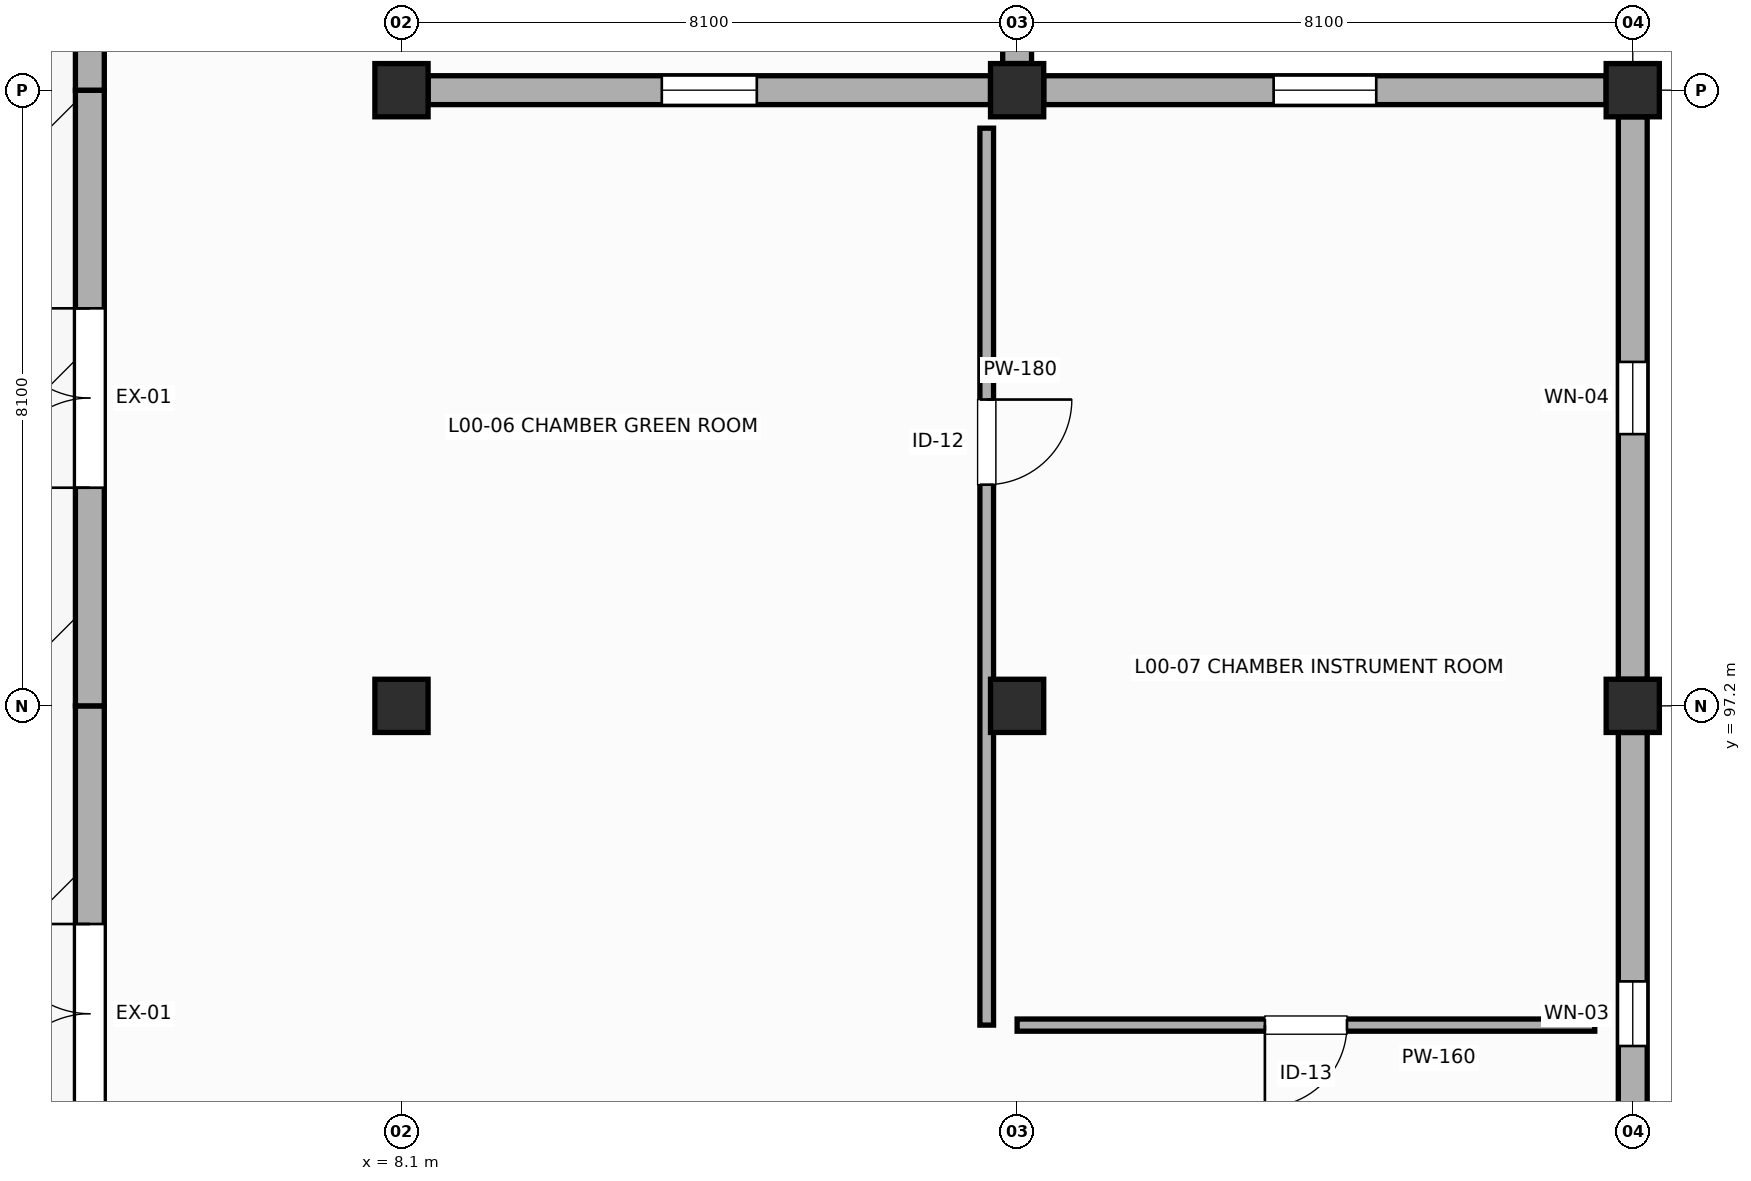
"""IFC4 building model, lengths in metres.
Left out: names, types, materials, properties, quantities, classifications, styles, units other than length and angle.
Written with IfcOpenShell. Run it as: python <this file> out.ifc"""

import sys

from ifc_helpers import new_model, si_unit, direction, frame, frame_2d, origin, origin_2d, place, context, subcontext, project, spatial, rectangle, extrude, element, fill, save


model = new_model("IFC4")
c1 = context("Model", 3, precision=1e-05, world=origin(), true_north=direction((0.0, 1.0)))
c2 = subcontext(c1, "Body", "Model", "MODEL_VIEW")
j1 = project(units=[si_unit("LENGTHUNIT", "METRE"), si_unit("PLANEANGLEUNIT", "RADIAN")], contexts=[c1])
p1 = place(None, origin())
s1 = spatial("IfcSite", under=j1, at=p1, CompositionType="ELEMENT")
p2 = place(p1, origin())
s2 = spatial("IfcBuilding", under=s1, at=p2, CompositionType="ELEMENT")
p3 = place(p2, origin())
s3 = spatial("IfcBuildingStorey", under=s2, at=p3, CompositionType="ELEMENT", Elevation=0.0)
for number, where, z_axis, x_axis in (
    (1, (8.1, 97.2, 0.0), (0.0, 0.0, 1.0), (1.0, 0.0, 0.0)),
    (2, (8.1, 105.3, 0.0), (0.0, 0.0, 1.0), (1.0, 0.0, 0.0)),
    (3, (16.2, 97.2, 0.0), (0.0, 0.0, 1.0), (1.0, 0.0, 0.0)),
    (4, (16.2, 105.3, 0.0), (0.0, 0.0, 1.0), (1.0, 0.0, 0.0)),
    (5, (24.3, 97.2, 0.0), (0.0, 0.0, 1.0), (1.0, 0.0, 0.0)),
    (6, (24.3, 105.3, 0.0), (0.0, 0.0, 1.0), (1.0, 0.0, 0.0)),
):
    element("IfcColumn", number, at=place(p3, frame(where, z_axis=z_axis, x_axis=x_axis)), inside=s3, PredefinedType="COLUMN", context=c2, shape_type="SweptSolid", body=[
        extrude(rectangle(XDim=0.7, YDim=0.7, at=origin_2d()), origin(), (0.0, 0.0, 1.0), 5.4),
    ])
p4 = place(p3, frame((4.0, 89.1, 0.0), z_axis=(0.0, 0.0, 1.0), x_axis=(0.0, 1.0, 0.0)))
e7 = element("IfcWall", 7, at=p4, inside=s3, PredefinedType="SOLIDWALL", context=c2, shape_type="SweptSolid", body=[
    extrude(rectangle(XDim=8.1, YDim=0.38, at=frame_2d((4.05, 0.0))), origin(), (0.0, 0.0, 1.0), 5.05),
])
p5 = place(p4, frame((2.87, 0.0, 0.0)))
e8 = element("IfcOpeningElement", 8, at=p5, cuts=e7, PredefinedType="OPENING", context=c2, shape_type="SweptSolid", body=[
    extrude(rectangle(XDim=2.36, YDim=2.4, at=frame_2d((1.18, 1.2))), frame((0.0, 0.2, 0.0), z_axis=(0.0, -1.0, 0.0), x_axis=(1.0, 0.0, 0.0)), (0.0, 0.0, 1.0), 0.4),
])
p6 = place(p3, frame((4.0, 97.2, 0.0), z_axis=(0.0, 0.0, 1.0), x_axis=(0.0, 1.0, 0.0)))
e9 = element("IfcWall", 9, at=p6, inside=s3, PredefinedType="SOLIDWALL", context=c2, shape_type="SweptSolid", body=[
    extrude(rectangle(XDim=8.1, YDim=0.38, at=frame_2d((4.05, 0.0))), origin(), (0.0, 0.0, 1.0), 5.05),
])
p7 = place(p6, frame((2.87, 0.0, 0.0)))
e10 = element("IfcOpeningElement", 10, at=p7, cuts=e9, PredefinedType="OPENING", context=c2, shape_type="SweptSolid", body=[
    extrude(rectangle(XDim=2.36, YDim=2.4, at=frame_2d((1.18, 1.2))), frame((0.0, 0.2, 0.0), z_axis=(0.0, -1.0, 0.0), x_axis=(1.0, 0.0, 0.0)), (0.0, 0.0, 1.0), 0.4),
])
p8 = place(p3, frame((8.45, 105.3, 0.0), z_axis=(0.0, 0.0, 1.0), x_axis=(1.0, 0.0, 0.0)))
e11 = element("IfcWall", 11, at=p8, inside=s3, PredefinedType="SOLIDWALL", context=c2, shape_type="SweptSolid", body=[
    extrude(rectangle(XDim=7.4, YDim=0.38, at=frame_2d((3.7, 0.0))), origin(), (0.0, 0.0, 1.0), 4.55),
])
p9 = place(p8, frame((3.075, 0.0, 0.9)))
e12 = element("IfcOpeningElement", 12, at=p9, cuts=e11, PredefinedType="OPENING", context=c2, shape_type="SweptSolid", body=[
    extrude(rectangle(XDim=1.25, YDim=1.55, at=frame_2d((0.625, 0.775))), frame((0.0, 0.2, 0.0), z_axis=(0.0, -1.0, 0.0), x_axis=(1.0, 0.0, 0.0)), (0.0, 0.0, 1.0), 0.4),
])
p10 = place(p3, frame((16.55, 105.3, 0.0), z_axis=(0.0, 0.0, 1.0), x_axis=(1.0, 0.0, 0.0)))
e13 = element("IfcWall", 13, at=p10, inside=s3, PredefinedType="SOLIDWALL", context=c2, shape_type="SweptSolid", body=[
    extrude(rectangle(XDim=7.4, YDim=0.38, at=frame_2d((3.7, 0.0))), origin(), (0.0, 0.0, 1.0), 4.677),
])
p11 = place(p10, frame((3.025, 0.0, 0.9)))
e14 = element("IfcOpeningElement", 14, at=p11, cuts=e13, PredefinedType="OPENING", context=c2, shape_type="SweptSolid", body=[
    extrude(rectangle(XDim=1.35, YDim=1.45, at=frame_2d((0.675, 0.725))), frame((0.0, 0.2, 0.0), z_axis=(0.0, -1.0, 0.0), x_axis=(1.0, 0.0, 0.0)), (0.0, 0.0, 1.0), 0.4),
])
p12 = place(p3, frame((24.3, 89.45, 0.0), z_axis=(0.0, 0.0, 1.0), x_axis=(0.0, 1.0, 0.0)))
e15 = element("IfcWall", 15, at=p12, inside=s3, PredefinedType="SOLIDWALL", context=c2, shape_type="SweptSolid", body=[
    extrude(rectangle(XDim=7.4, YDim=0.38, at=frame_2d((3.7, 0.0))), origin(), (0.0, 0.0, 1.0), 4.737),
])
p13 = place(p12, frame((3.275, 0.0, 0.9)))
e16 = element("IfcOpeningElement", 16, at=p13, cuts=e15, PredefinedType="OPENING", context=c2, shape_type="SweptSolid", body=[
    extrude(rectangle(XDim=0.85, YDim=1.75, at=frame_2d((0.425, 0.875))), frame((0.0, 0.2, 0.0), z_axis=(0.0, -1.0, 0.0), x_axis=(1.0, 0.0, 0.0)), (0.0, 0.0, 1.0), 0.4),
])
p14 = place(p3, frame((24.3, 97.55, 0.0), z_axis=(0.0, 0.0, 1.0), x_axis=(0.0, 1.0, 0.0)))
e17 = element("IfcWall", 17, at=p14, inside=s3, PredefinedType="SOLIDWALL", context=c2, shape_type="SweptSolid", body=[
    extrude(rectangle(XDim=7.4, YDim=0.38, at=frame_2d((3.7, 0.0))), origin(), (0.0, 0.0, 1.0), 4.737),
])
p15 = place(p14, frame((3.225, 0.0, 0.9)))
e18 = element("IfcOpeningElement", 18, at=p15, cuts=e17, PredefinedType="OPENING", context=c2, shape_type="SweptSolid", body=[
    extrude(rectangle(XDim=0.95, YDim=1.25, at=frame_2d((0.475, 0.625))), frame((0.0, 0.2, 0.0), z_axis=(0.0, -1.0, 0.0), x_axis=(1.0, 0.0, 0.0)), (0.0, 0.0, 1.0), 0.4),
])
p16 = place(p3, frame((16.2, 105.65, 0.0), z_axis=(0.0, 0.0, 1.0), x_axis=(0.0, 1.0, 0.0)))
e19 = element("IfcWall", 19, at=p16, inside=s3, PredefinedType="SOLIDWALL", context=c2, shape_type="SweptSolid", body=[
    extrude(rectangle(XDim=7.4, YDim=0.38, at=frame_2d((3.7, 0.0))), origin(), (0.0, 0.0, 1.0), 4.807),
])
p17 = place(p16, frame((3.225, 0.0, 0.9)))
e20 = element("IfcOpeningElement", 20, at=p17, cuts=e19, PredefinedType="OPENING", context=c2, shape_type="SweptSolid", body=[
    extrude(rectangle(XDim=0.95, YDim=1.55, at=frame_2d((0.475, 0.775))), frame((0.0, 0.2, 0.0), z_axis=(0.0, -1.0, 0.0), x_axis=(1.0, 0.0, 0.0)), (0.0, 0.0, 1.0), 0.4),
])
p18 = place(p3, frame((4.0, 113.4, 0.0), z_axis=(0.0, 0.0, 1.0), x_axis=(0.0, -1.0, 0.0)))
e21 = element("IfcWall", 21, at=p18, inside=s3, PredefinedType="SOLIDWALL", context=c2, shape_type="SweptSolid", body=[
    extrude(rectangle(XDim=8.1, YDim=0.38, at=frame_2d((4.05, 0.0))), origin(), (0.0, 0.0, 1.0), 5.1),
])
p19 = place(p18, frame((3.525, 0.0, 0.9)))
e22 = element("IfcOpeningElement", 22, at=p19, cuts=e21, PredefinedType="OPENING", context=c2, shape_type="SweptSolid", body=[
    extrude(rectangle(XDim=1.05, YDim=1.35, at=frame_2d((0.525, 0.675))), frame((0.0, 0.2, 0.0), z_axis=(0.0, -1.0, 0.0), x_axis=(1.0, 0.0, 0.0)), (0.0, 0.0, 1.0), 0.4),
])
p20 = place(p3, frame((15.8, 104.8, 0.0), z_axis=(0.0, 0.0, 1.0), x_axis=(0.0, -1.0, 0.0)))
e23 = element("IfcWall", 23, at=p20, inside=s3, PredefinedType="PARTITIONING", context=c2, shape_type="SweptSolid", body=[
    extrude(rectangle(XDim=11.8, YDim=0.18, at=frame_2d((5.9, 0.0))), origin(), (0.0, 0.0, 1.0), 5.12),
])
p21 = place(p20, frame((3.57, 0.0, 0.0)))
e24 = element("IfcOpeningElement", 24, at=p21, cuts=e23, PredefinedType="OPENING", context=c2, shape_type="SweptSolid", body=[
    extrude(rectangle(XDim=1.12, YDim=2.18, at=frame_2d((0.56, 1.09))), frame((0.0, 0.1, 0.0), z_axis=(0.0, -1.0, 0.0), x_axis=(1.0, 0.0, 0.0)), (0.0, 0.0, 1.0), 0.2),
])
p22 = place(p3, frame((23.8, 93.0, 0.0), z_axis=(0.0, 0.0, 1.0), x_axis=(-1.0, 0.0, 0.0)))
e25 = element("IfcWall", 25, at=p22, inside=s3, PredefinedType="PARTITIONING", context=c2, shape_type="SweptSolid", body=[
    extrude(rectangle(XDim=7.6, YDim=0.16, at=frame_2d((3.8, 0.0))), origin(), (0.0, 0.0, 1.0), 4.788),
])
p23 = place(p22, frame((3.26, 0.0, 0.0)))
e26 = element("IfcOpeningElement", 26, at=p23, cuts=e25, PredefinedType="OPENING", context=c2, shape_type="SweptSolid", body=[
    extrude(rectangle(XDim=1.08, YDim=2.15, at=frame_2d((0.54, 1.075))), frame((0.0, 0.09, 0.0), z_axis=(0.0, -1.0, 0.0), x_axis=(1.0, 0.0, 0.0)), (0.0, 0.0, 1.0), 0.18),
])
p24 = place(p5, origin())
e27 = element("IfcDoor", 27, at=p24, inside=s3, OperationType="DOUBLE_DOOR_SINGLE_SWING", PredefinedType="DOOR", context=c2, shape_type="SweptSolid", body=[
    extrude(rectangle(XDim=2.36, YDim=2.4, at=frame_2d((1.18, 1.2))), frame((0.0, 0.025, 0.0), z_axis=(0.0, -1.0, 0.0), x_axis=(1.0, 0.0, 0.0)), (0.0, 0.0, 1.0), 0.05),
])
fill(e8, e27)
p25 = place(p7, origin())
e28 = element("IfcDoor", 28, at=p25, inside=s3, OperationType="DOUBLE_DOOR_SINGLE_SWING", PredefinedType="DOOR", context=c2, shape_type="SweptSolid", body=[
    extrude(rectangle(XDim=2.36, YDim=2.4, at=frame_2d((1.18, 1.2))), frame((0.0, 0.025, 0.0), z_axis=(0.0, -1.0, 0.0), x_axis=(1.0, 0.0, 0.0)), (0.0, 0.0, 1.0), 0.05),
])
fill(e10, e28)
p26 = place(p9, origin())
e29 = element("IfcWindow", 29, at=p26, inside=s3, PartitioningType="SINGLE_PANEL", PredefinedType="WINDOW", context=c2, shape_type="SweptSolid", body=[
    extrude(rectangle(XDim=1.25, YDim=1.55, at=frame_2d((0.625, 0.775))), frame((0.0, 0.03, 0.0), z_axis=(0.0, -1.0, 0.0), x_axis=(1.0, 0.0, 0.0)), (0.0, 0.0, 1.0), 0.06),
])
fill(e12, e29)
p27 = place(p11, origin())
e30 = element("IfcWindow", 30, at=p27, inside=s3, PartitioningType="SINGLE_PANEL", PredefinedType="WINDOW", context=c2, shape_type="SweptSolid", body=[
    extrude(rectangle(XDim=1.35, YDim=1.45, at=frame_2d((0.675, 0.725))), frame((0.0, 0.03, 0.0), z_axis=(0.0, -1.0, 0.0), x_axis=(1.0, 0.0, 0.0)), (0.0, 0.0, 1.0), 0.06),
])
fill(e14, e30)
p28 = place(p13, origin())
e31 = element("IfcWindow", 31, at=p28, inside=s3, PartitioningType="SINGLE_PANEL", PredefinedType="WINDOW", context=c2, shape_type="SweptSolid", body=[
    extrude(rectangle(XDim=0.85, YDim=1.75, at=frame_2d((0.425, 0.875))), frame((0.0, 0.03, 0.0), z_axis=(0.0, -1.0, 0.0), x_axis=(1.0, 0.0, 0.0)), (0.0, 0.0, 1.0), 0.06),
])
fill(e16, e31)
p29 = place(p15, origin())
e32 = element("IfcWindow", 32, at=p29, inside=s3, PartitioningType="SINGLE_PANEL", PredefinedType="WINDOW", context=c2, shape_type="SweptSolid", body=[
    extrude(rectangle(XDim=0.95, YDim=1.25, at=frame_2d((0.475, 0.625))), frame((0.0, 0.03, 0.0), z_axis=(0.0, -1.0, 0.0), x_axis=(1.0, 0.0, 0.0)), (0.0, 0.0, 1.0), 0.06),
])
fill(e18, e32)
p30 = place(p21, origin())
e33 = element("IfcDoor", 33, at=p30, inside=s3, OperationType="SINGLE_SWING_LEFT", PredefinedType="DOOR", context=c2, shape_type="SweptSolid", body=[
    extrude(rectangle(XDim=1.12, YDim=2.18, at=frame_2d((0.56, 1.09))), frame((0.0, 0.025, 0.0), z_axis=(0.0, -1.0, 0.0), x_axis=(1.0, 0.0, 0.0)), (0.0, 0.0, 1.0), 0.05),
])
fill(e24, e33)
p31 = place(p23, origin())
e34 = element("IfcDoor", 34, at=p31, inside=s3, OperationType="SINGLE_SWING_RIGHT", PredefinedType="DOOR", context=c2, shape_type="SweptSolid", body=[
    extrude(rectangle(XDim=1.08, YDim=2.15, at=frame_2d((0.54, 1.075))), frame((0.0, 0.025, 0.0), z_axis=(0.0, -1.0, 0.0), x_axis=(1.0, 0.0, 0.0)), (0.0, 0.0, 1.0), 0.05),
])
fill(e26, e34)
save(model, sys.argv[1])
